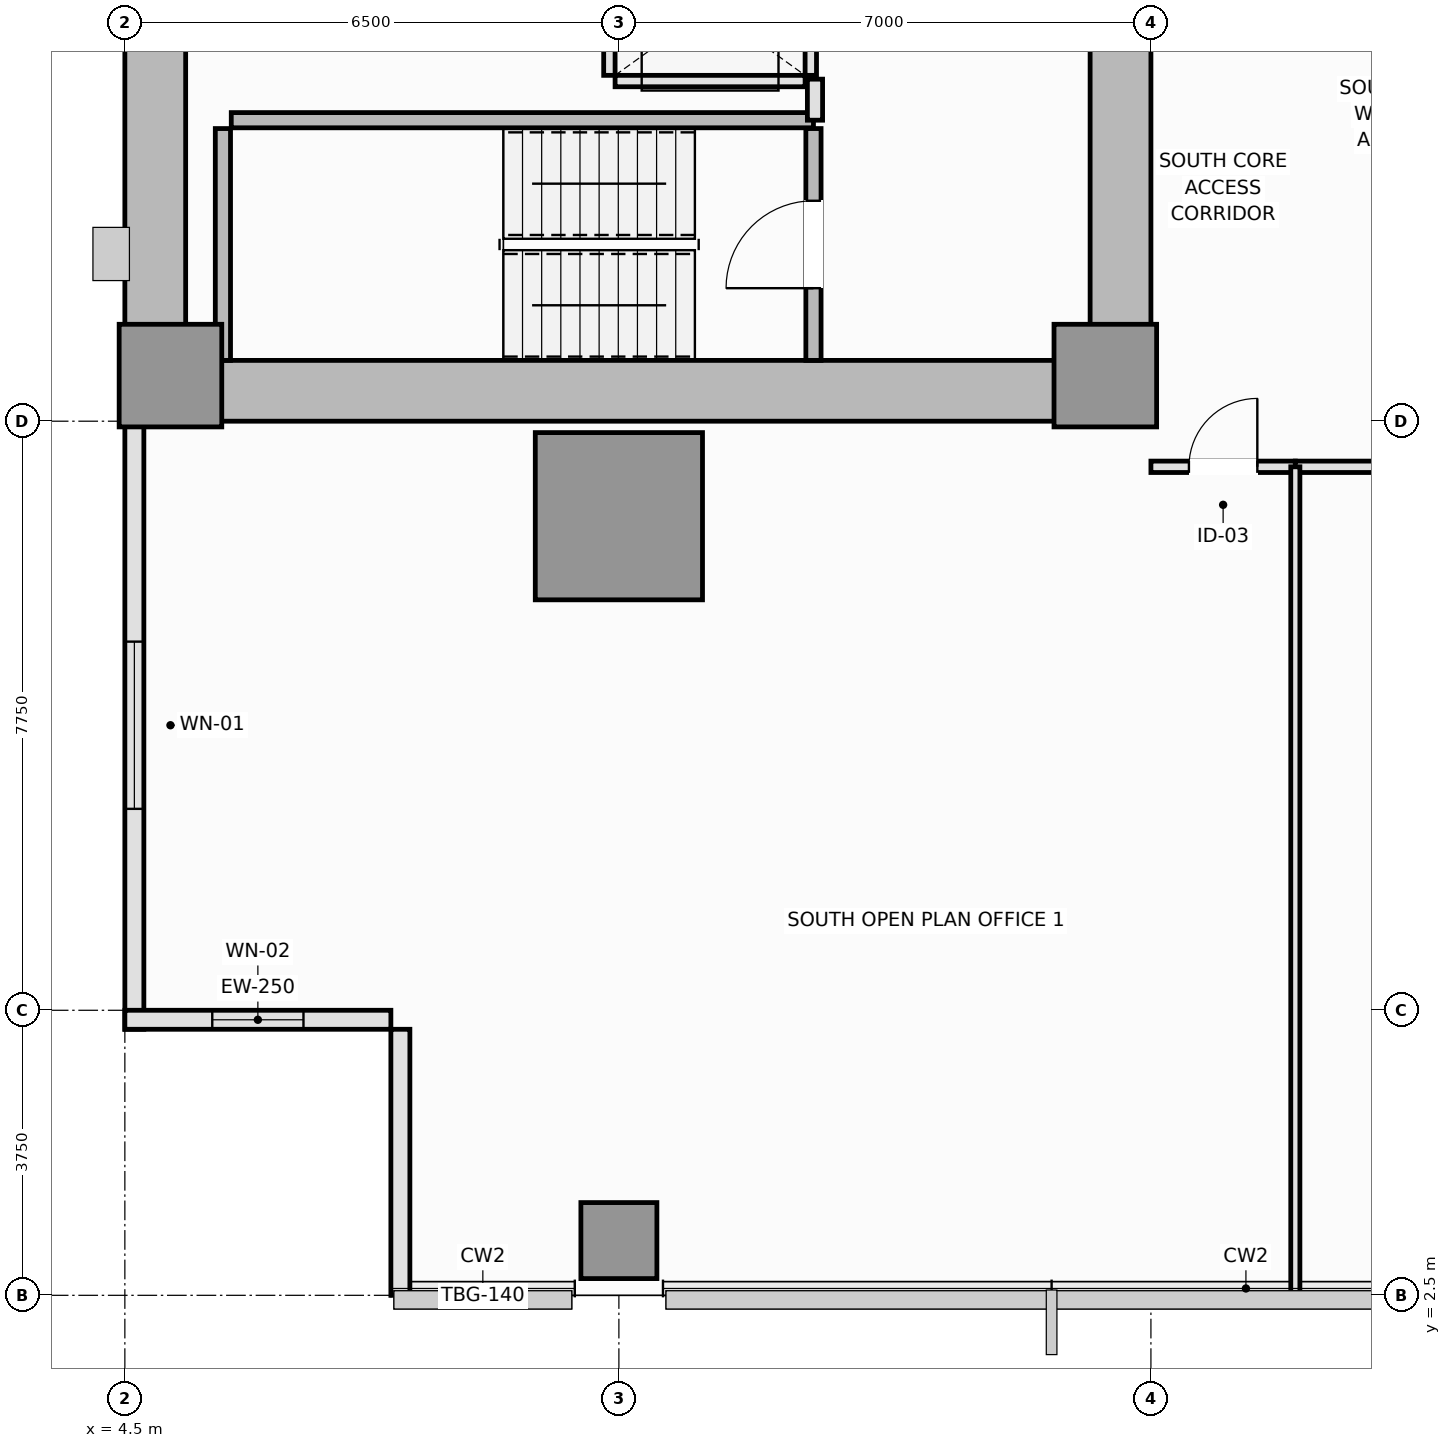
"""IFC4 building model, lengths in metres.
Left out: names, types, materials, properties, quantities, classifications, styles, units other than length and angle.
Written with IfcOpenShell. Run it as: python <this file> out.ifc"""

import sys

from ifc_helpers import new_model, si_unit, direction, frame, frame_2d, origin, origin_2d, place, context, subcontext, project, spatial, rectangle, extrude, element, fill, save


model = new_model("IFC4")
c1 = context("Model", 3, precision=1e-05, world=origin(), true_north=direction((0.0, 1.0)))
c2 = subcontext(c1, "Body", "Model", "MODEL_VIEW")
j1 = project(units=[si_unit("LENGTHUNIT", "METRE"), si_unit("PLANEANGLEUNIT", "RADIAN")], contexts=[c1])
p1 = place(None, origin())
s1 = spatial("IfcSite", under=j1, at=p1, CompositionType="ELEMENT")
p2 = place(p1, origin())
s2 = spatial("IfcBuilding", under=s1, at=p2, CompositionType="ELEMENT")
p3 = place(p2, frame((0.0, 0.0, 54.0)))
s3 = spatial("IfcBuildingStorey", under=s2, at=p3, CompositionType="ELEMENT", Elevation=54.0)
p4 = place(p3, frame((4.5, 14.4, 0.0), z_axis=(0.0, 0.0, 1.0), x_axis=(1.0, 0.0, 0.0)))
e1 = element("IfcWall", 1, at=p4, inside=s3, PredefinedType="SHEAR", context=c2, shape_type="SweptSolid", body=[
    extrude(rectangle(XDim=13.5, YDim=0.8, at=frame_2d((6.75, 0.0))), origin(), (0.0, 0.0, 1.0), 3.55),
])
p5 = place(p3, frame((4.9, 14.8, 0.0), z_axis=(0.0, 0.0, 1.0), x_axis=(0.0, 1.0, 0.0)))
e2 = element("IfcWall", 2, at=p5, inside=s3, PredefinedType="SHEAR", context=c2, shape_type="SweptSolid", body=[
    extrude(rectangle(XDim=20.9, YDim=0.8, at=frame_2d((10.45, 0.0))), origin(), (0.0, 0.0, 1.0), 3.55),
])
p6 = place(p3, frame((17.6, 14.8, 0.0), z_axis=(0.0, 0.0, 1.0), x_axis=(0.0, 1.0, 0.0)))
e3 = element("IfcWall", 3, at=p6, inside=s3, PredefinedType="SHEAR", context=c2, shape_type="SweptSolid", body=[
    extrude(rectangle(XDim=8.65, YDim=0.8, at=frame_2d((4.325, 0.0))), origin(), (0.0, 0.0, 1.0), 3.55),
])
p7 = place(p6, frame((4.1, 0.0, 0.0)))
e4 = element("IfcOpeningElement", 4, at=p7, cuts=e3, PredefinedType="OPENING", context=c2, shape_type="SweptSolid", body=[
    extrude(rectangle(XDim=1.1, YDim=2.15, at=frame_2d((0.55, 1.075))), frame((0.0, 0.41, 0.0), z_axis=(0.0, -1.0, 0.0), x_axis=(1.0, 0.0, 0.0)), (0.0, 0.0, 1.0), 0.82),
])
for number, where, z_axis, x_axis in (
    (5, (5.1, 14.6, 0.0), (0.0, 0.0, 1.0), (1.0, 0.0, 0.0)),
    (6, (17.4, 14.6, 0.0), (0.0, 0.0, 1.0), (1.0, 0.0, 0.0)),
):
    element("IfcColumn", number, at=place(p3, frame(where, z_axis=z_axis, x_axis=x_axis)), inside=s3, PredefinedType="PILASTER", context=c2, shape_type="SweptSolid", body=[
        extrude(rectangle(XDim=1.35, YDim=1.35, at=origin_2d()), origin(), (0.0, 0.0, 1.0), 3.55),
    ])
p8 = place(p3, frame((11.0, 12.75, 0.0), z_axis=(0.0, 0.0, 1.0), x_axis=(1.0, 0.0, 0.0)))
e7 = element("IfcColumn", 7, at=p8, inside=s3, PredefinedType="COLUMN", context=c2, shape_type="SweptSolid", body=[
    extrude(rectangle(XDim=2.2, YDim=2.2, at=origin_2d()), origin(), (0.0, 0.0, 1.0), 3.55),
])
p9 = place(p3, frame((11.0, 3.22, 0.0), z_axis=(0.0, 0.0, 1.0), x_axis=(1.0, 0.0, 0.0)))
e8 = element("IfcColumn", 8, at=p9, inside=s3, PredefinedType="COLUMN", context=c2, shape_type="SweptSolid", body=[
    extrude(rectangle(XDim=1.0, YDim=1.0, at=origin_2d()), origin(), (0.0, 0.0, 1.0), 3.55),
])
p10 = place(p3, frame((4.625, 14.0, 0.0), z_axis=(0.0, 0.0, 1.0), x_axis=(0.0, -1.0, 0.0)))
e9 = element("IfcWall", 9, at=p10, inside=s3, PredefinedType="SOLIDWALL", context=c2, shape_type="SweptSolid", body=[
    extrude(rectangle(XDim=8.0, YDim=0.25, at=frame_2d((4.0, 0.0))), origin(), (0.0, 0.0, 1.0), 3.37),
])
p11 = place(p10, frame((2.9, 0.0, 0.9)))
e10 = element("IfcOpeningElement", 10, at=p11, cuts=e9, PredefinedType="OPENING", context=c2, shape_type="SweptSolid", body=[
    extrude(rectangle(XDim=2.2, YDim=1.8, at=frame_2d((1.1, 0.9))), frame((0.0, 0.135, 0.0), z_axis=(0.0, -1.0, 0.0), x_axis=(1.0, 0.0, 0.0)), (0.0, 0.0, 1.0), 0.27),
])
p12 = place(p3, frame((4.5, 6.125, 0.0), z_axis=(0.0, 0.0, 1.0), x_axis=(1.0, 0.0, 0.0)))
e11 = element("IfcWall", 11, at=p12, inside=s3, PredefinedType="SOLIDWALL", context=c2, shape_type="SweptSolid", body=[
    extrude(rectangle(XDim=3.5, YDim=0.25, at=frame_2d((1.75, 0.0))), origin(), (0.0, 0.0, 1.0), 3.37),
])
p13 = place(p12, frame((1.15, 0.0, 0.9)))
e12 = element("IfcOpeningElement", 12, at=p13, cuts=e11, PredefinedType="OPENING", context=c2, shape_type="SweptSolid", body=[
    extrude(rectangle(XDim=1.2, YDim=1.8, at=frame_2d((0.6, 0.9))), frame((0.0, 0.135, 0.0), z_axis=(0.0, -1.0, 0.0), x_axis=(1.0, 0.0, 0.0)), (0.0, 0.0, 1.0), 0.27),
])
p14 = place(p3, frame((8.125, 6.0, 0.0), z_axis=(0.0, 0.0, 1.0), x_axis=(0.0, -1.0, 0.0)))
e13 = element("IfcWall", 13, at=p14, inside=s3, PredefinedType="SOLIDWALL", context=c2, shape_type="SweptSolid", body=[
    extrude(rectangle(XDim=3.5, YDim=0.25, at=frame_2d((1.75, 0.0))), origin(), (0.0, 0.0, 1.0), 3.37),
])
p15 = place(p3, frame((5.79, 14.8, 0.0), z_axis=(0.0, 0.0, 1.0), x_axis=(0.0, 1.0, 0.0)))
e14 = element("IfcWall", 14, at=p15, inside=s3, PredefinedType="SOLIDWALL", context=c2, shape_type="SweptSolid", body=[
    extrude(rectangle(XDim=3.05, YDim=0.2, at=frame_2d((1.525, 0.0))), origin(), (0.0, 0.0, 1.0), 3.55),
])
p16 = place(p3, frame((5.9, 17.96, 0.0), z_axis=(0.0, 0.0, 1.0), x_axis=(1.0, 0.0, 0.0)))
e15 = element("IfcWall", 15, at=p16, inside=s3, PredefinedType="SOLIDWALL", context=c2, shape_type="SweptSolid", body=[
    extrude(rectangle(XDim=7.66, YDim=0.2, at=frame_2d((3.83, 0.0))), origin(), (0.0, 0.0, 1.0), 3.55),
])
p17 = place(p3, frame((13.56, 14.8, 0.0), z_axis=(0.0, 0.0, 1.0), x_axis=(0.0, 1.0, 0.0)))
e16 = element("IfcWall", 16, at=p17, inside=s3, PredefinedType="SOLIDWALL", context=c2, shape_type="SweptSolid", body=[
    extrude(rectangle(XDim=3.05, YDim=0.2, at=frame_2d((1.525, 0.0))), origin(), (0.0, 0.0, 1.0), 3.55),
])
p18 = place(p17, frame((0.95, 0.0, 0.0)))
e17 = element("IfcOpeningElement", 17, at=p18, cuts=e16, PredefinedType="OPENING", context=c2, shape_type="SweptSolid", body=[
    extrude(rectangle(XDim=1.15, YDim=2.15, at=frame_2d((0.575, 1.075))), frame((0.0, 0.11, 0.0), z_axis=(0.0, -1.0, 0.0), x_axis=(1.0, 0.0, 0.0)), (0.0, 0.0, 1.0), 0.22),
])
p19 = place(p3, frame((10.95, 18.475, 0.0), z_axis=(0.0, 0.0, 1.0), x_axis=(1.0, 0.0, 0.0)))
e18 = element("IfcWall", 18, at=p19, inside=s3, PredefinedType="PARTITIONING", context=c2, shape_type="SweptSolid", body=[
    extrude(rectangle(XDim=2.5, YDim=0.15, at=frame_2d((1.25, 0.0))), origin(), (0.0, 0.0, 1.0), 3.37),
])
p20 = place(p3, frame((10.875, 18.55, 0.0), z_axis=(0.0, 0.0, 1.0), x_axis=(0.0, 1.0, 0.0)))
e19 = element("IfcWall", 19, at=p20, inside=s3, PredefinedType="PARTITIONING", context=c2, shape_type="SweptSolid", body=[
    extrude(rectangle(XDim=1.8, YDim=0.15, at=frame_2d((0.9, 0.0))), origin(), (0.0, 0.0, 1.0), 3.37),
])
p21 = place(p3, frame((13.525, 18.55, 0.0), z_axis=(0.0, 0.0, 1.0), x_axis=(0.0, 1.0, 0.0)))
e20 = element("IfcWall", 20, at=p21, inside=s3, PredefinedType="PARTITIONING", context=c2, shape_type="SweptSolid", body=[
    extrude(rectangle(XDim=1.8, YDim=0.15, at=frame_2d((0.9, 0.0))), origin(), (0.0, 0.0, 1.0), 3.37),
])
p22 = place(p21, frame((0.35, 0.0, 0.0)))
e21 = element("IfcOpeningElement", 21, at=p22, cuts=e20, PredefinedType="OPENING", context=c2, shape_type="SweptSolid", body=[
    extrude(rectangle(XDim=1.1, YDim=2.2, at=frame_2d((0.55, 1.1))), frame((0.0, 0.085, 0.0), z_axis=(0.0, -1.0, 0.0), x_axis=(1.0, 0.0, 0.0)), (0.0, 0.0, 1.0), 0.17),
])
p23 = place(p3, frame((13.58, 17.96, 0.0), z_axis=(0.0, 0.0, 1.0), x_axis=(0.0, 1.0, 0.0)))
e22 = element("IfcWall", 22, at=p23, inside=s3, PredefinedType="PARTITIONING", context=c2, shape_type="SweptSolid", body=[
    extrude(rectangle(XDim=0.54, YDim=0.2, at=frame_2d((0.27, 0.0))), origin(), (0.0, 0.0, 1.0), 3.37),
])
p24 = place(p3, frame((18.0, 13.4, 0.0), z_axis=(0.0, 0.0, 1.0), x_axis=(1.0, 0.0, 0.0)))
e23 = element("IfcWall", 23, at=p24, inside=s3, PredefinedType="PARTITIONING", context=c2, shape_type="SweptSolid", body=[
    extrude(rectangle(XDim=1.9, YDim=0.15, at=frame_2d((0.95, 0.0))), origin(), (0.0, 0.0, 1.0), 3.37),
])
p25 = place(p24, frame((0.5, 0.0, 0.0)))
e24 = element("IfcOpeningElement", 24, at=p25, cuts=e23, PredefinedType="OPENING", context=c2, shape_type="SweptSolid", body=[
    extrude(rectangle(XDim=0.9, YDim=2.1, at=frame_2d((0.45, 1.05))), frame((0.0, 0.085, 0.0), z_axis=(0.0, -1.0, 0.0), x_axis=(1.0, 0.0, 0.0)), (0.0, 0.0, 1.0), 0.17),
])
p26 = place(p3, frame((19.9, 13.4, 0.0), z_axis=(0.0, 0.0, 1.0), x_axis=(1.0, 0.0, 0.0)))
e25 = element("IfcWall", 25, at=p26, inside=s3, PredefinedType="PARTITIONING", context=c2, shape_type="SweptSolid", body=[
    extrude(rectangle(XDim=20.2, YDim=0.15, at=frame_2d((10.1, 0.0))), origin(), (0.0, 0.0, 1.0), 3.37),
])
p27 = place(p26, frame((9.6, 0.0, 0.0)))
e26 = element("IfcOpeningElement", 26, at=p27, cuts=e25, PredefinedType="OPENING", context=c2, shape_type="SweptSolid", body=[
    extrude(rectangle(XDim=1.0, YDim=2.15, at=frame_2d((0.5, 1.075))), frame((0.0, 0.085, 0.0), z_axis=(0.0, -1.0, 0.0), x_axis=(1.0, 0.0, 0.0)), (0.0, 0.0, 1.0), 0.17),
])
p28 = place(p3, frame((19.9, 2.51, 0.0), z_axis=(0.0, 0.0, 1.0), x_axis=(0.0, 1.0, 0.0)))
e27 = element("IfcWall", 27, at=p28, inside=s3, PredefinedType="PARTITIONING", context=c2, shape_type="SweptSolid", body=[
    extrude(rectangle(XDim=10.89, YDim=0.12, at=frame_2d((5.445, 0.0))), origin(), (0.0, 0.0, 1.0), 3.37),
])
p29 = place(p11, origin())
e28 = element("IfcWindow", 28, at=p29, inside=s3, PartitioningType="SINGLE_PANEL", PredefinedType="WINDOW", context=c2, shape_type="SweptSolid", body=[
    extrude(rectangle(XDim=2.2, YDim=1.8, at=frame_2d((1.1, 0.9))), frame((0.0, 0.03, 0.0), z_axis=(0.0, -1.0, 0.0), x_axis=(1.0, 0.0, 0.0)), (0.0, 0.0, 1.0), 0.06),
])
fill(e10, e28)
p30 = place(p13, origin())
e29 = element("IfcWindow", 29, at=p30, inside=s3, PartitioningType="SINGLE_PANEL", PredefinedType="WINDOW", context=c2, shape_type="SweptSolid", body=[
    extrude(rectangle(XDim=1.2, YDim=1.8, at=frame_2d((0.6, 0.9))), frame((0.0, 0.03, 0.0), z_axis=(0.0, -1.0, 0.0), x_axis=(1.0, 0.0, 0.0)), (0.0, 0.0, 1.0), 0.06),
])
fill(e12, e29)
p31 = place(p18, origin())
e30 = element("IfcDoor", 30, at=p31, inside=s3, OperationType="SINGLE_SWING_LEFT", PredefinedType="DOOR", context=c2, shape_type="SweptSolid", body=[
    extrude(rectangle(XDim=1.15, YDim=2.15, at=frame_2d((0.575, 1.075))), frame((0.0, 0.025, 0.0), z_axis=(0.0, -1.0, 0.0), x_axis=(1.0, 0.0, 0.0)), (0.0, 0.0, 1.0), 0.05),
])
fill(e17, e30)
p32 = place(p25, origin())
e31 = element("IfcDoor", 31, at=p32, inside=s3, OperationType="SINGLE_SWING_RIGHT", PredefinedType="DOOR", context=c2, shape_type="SweptSolid", body=[
    extrude(rectangle(XDim=0.9, YDim=2.1, at=frame_2d((0.45, 1.05))), frame((0.0, 0.025, 0.0), z_axis=(0.0, -1.0, 0.0), x_axis=(1.0, 0.0, 0.0)), (0.0, 0.0, 1.0), 0.05),
])
fill(e24, e31)
save(model, sys.argv[1])
